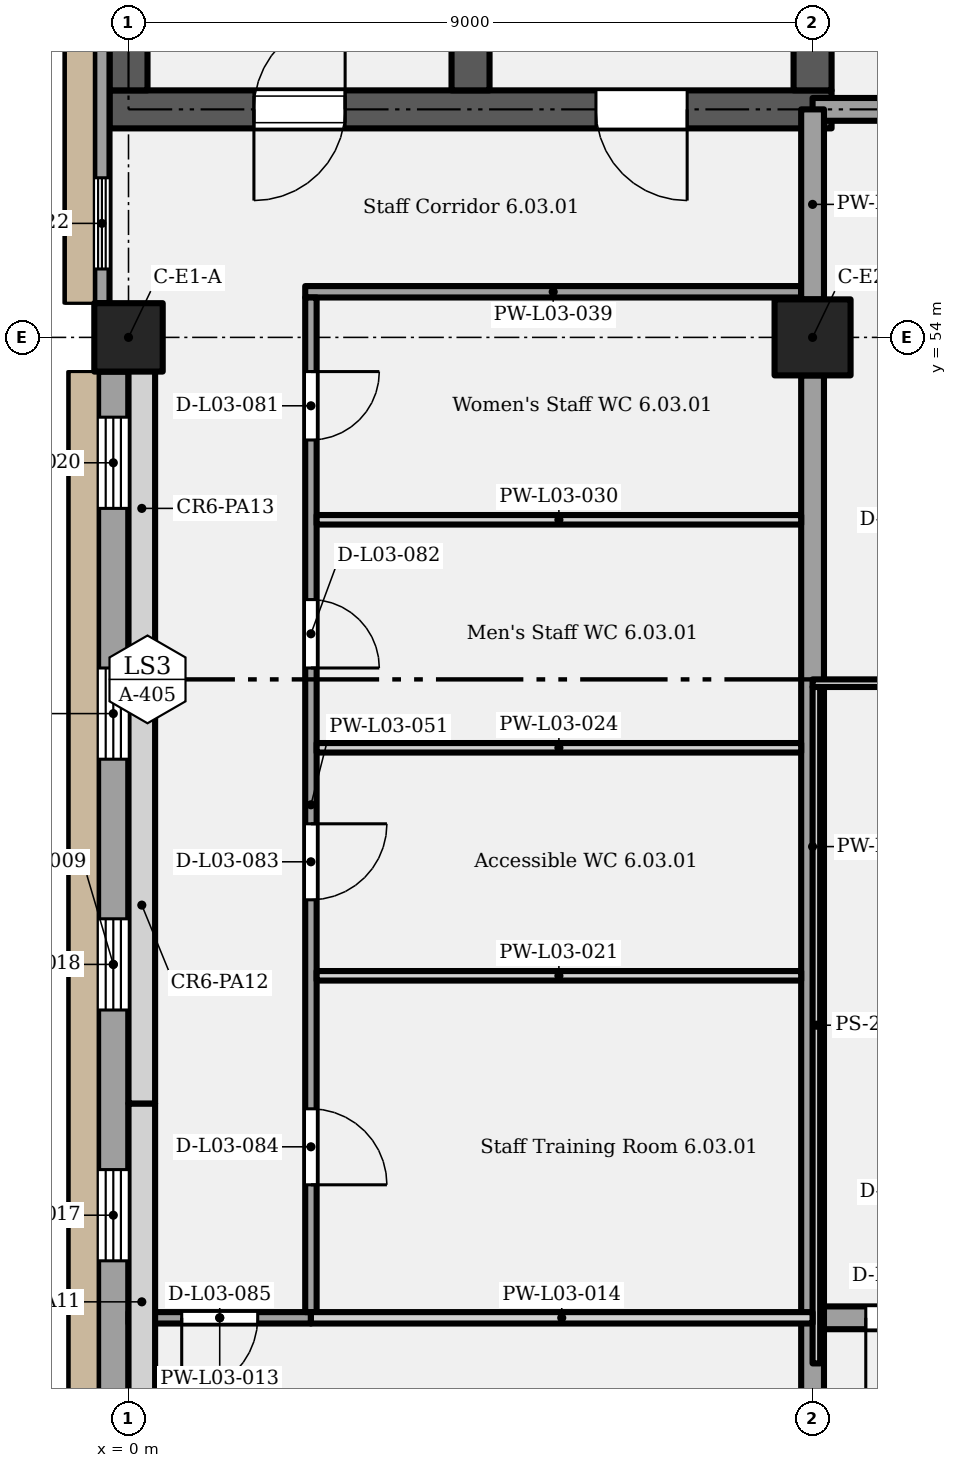
"""IFC4 building model, lengths in metres.
Left out: names, types, materials, properties, quantities, classifications, styles, units other than length and angle.
Written with IfcOpenShell. Run it as: python <this file> out.ifc"""

import sys

from ifc_helpers import new_model, si_unit, direction, frame, frame_2d, origin, origin_2d, place, context, subcontext, project, spatial, rectangle, extrude, element, fill, save


model = new_model("IFC4")
c1 = context("Model", 3, precision=1e-05, world=origin(), true_north=direction((0.0, 1.0)))
c2 = subcontext(c1, "Body", "Model", "MODEL_VIEW")
j1 = project(units=[si_unit("LENGTHUNIT", "METRE"), si_unit("PLANEANGLEUNIT", "RADIAN")], contexts=[c1])
p1 = place(None, origin())
s1 = spatial("IfcSite", under=j1, at=p1, CompositionType="ELEMENT")
p2 = place(p1, origin())
s2 = spatial("IfcBuilding", under=s1, at=p2, CompositionType="ELEMENT")
p3 = place(p2, frame((0.0, 0.0, 17.4)))
s3 = spatial("IfcBuildingStorey", under=s2, at=p3, CompositionType="ELEMENT", Elevation=17.4)
p4 = place(p3, frame((0.0, 54.0, 0.0), z_axis=(0.0, 0.0, 1.0), x_axis=(1.0, 0.0, 0.0)))
e1 = element("IfcColumn", 1, at=p4, inside=s3, PredefinedType="COLUMN", context=c2, shape_type="SweptSolid", body=[
    extrude(rectangle(XDim=0.9, YDim=0.9, at=origin_2d()), origin(), (0.0, 0.0, 1.0), 5.4),
])
p5 = place(p3, frame((9.0, 54.0, 0.0), z_axis=(0.0, 0.0, 1.0), x_axis=(1.0, 0.0, 0.0)))
e2 = element("IfcColumn", 2, at=p5, inside=s3, PredefinedType="COLUMN", context=c2, shape_type="SweptSolid", body=[
    extrude(rectangle(XDim=1.0, YDim=1.0, at=origin_2d()), origin(), (0.0, 0.0, 1.0), 5.4),
])
p6 = place(p3, frame((-0.25, 57.0, 0.0), z_axis=(0.0, 0.0, 1.0), x_axis=(1.0, 0.0, 0.0)))
e3 = element("IfcWall", 3, at=p6, inside=s3, PredefinedType="SHEAR", context=c2, shape_type="SweptSolid", body=[
    extrude(rectangle(XDim=9.5, YDim=0.5, at=frame_2d((4.75, 0.0))), origin(), (0.0, 0.0, 1.0), 5.15),
])
p7 = place(p6, frame((1.9, 0.0, 0.0)))
e4 = element("IfcOpeningElement", 4, at=p7, cuts=e3, PredefinedType="OPENING", context=c2, shape_type="SweptSolid", body=[
    extrude(rectangle(XDim=1.2, YDim=2.1, at=frame_2d((0.6, 1.05))), frame((0.0, 0.26, 0.0), z_axis=(0.0, -1.0, 0.0), x_axis=(1.0, 0.0, 0.0)), (0.0, 0.0, 1.0), 0.52),
])
p8 = place(p6, frame((7.6, 0.0, 0.0), z_axis=(0.0, 0.0, 1.0), x_axis=(-1.0, 0.0, 0.0)))
e5 = element("IfcOpeningElement", 5, at=p8, cuts=e3, PredefinedType="OPENING", context=c2, shape_type="SweptSolid", body=[
    extrude(rectangle(XDim=1.2, YDim=2.1, at=frame_2d((0.6, 1.05))), frame((0.0, 0.26, 0.0), z_axis=(0.0, -1.0, 0.0), x_axis=(1.0, 0.0, 0.0)), (0.0, 0.0, 1.0), 0.52),
])
p9 = place(p3, frame((0.0, 57.25, 0.0), z_axis=(0.0, 0.0, 1.0), x_axis=(0.0, 1.0, 0.0)))
e6 = element("IfcWall", 6, at=p9, inside=s3, PredefinedType="SHEAR", context=c2, shape_type="SweptSolid", body=[
    extrude(rectangle(XDim=8.3, YDim=0.5, at=frame_2d((4.15, 0.0))), origin(), (0.0, 0.0, 1.0), 5.15),
])
p10 = place(p3, frame((4.5, 57.25, 0.0), z_axis=(0.0, 0.0, 1.0), x_axis=(0.0, 1.0, 0.0)))
e7 = element("IfcWall", 7, at=p10, inside=s3, PredefinedType="SHEAR", context=c2, shape_type="SweptSolid", body=[
    extrude(rectangle(XDim=8.5, YDim=0.5, at=frame_2d((4.25, 0.0))), origin(), (0.0, 0.0, 1.0), 5.15),
])
p11 = place(p3, frame((9.0, 57.25, 0.0), z_axis=(0.0, 0.0, 1.0), x_axis=(0.0, 1.0, 0.0)))
e8 = element("IfcWall", 8, at=p11, inside=s3, PredefinedType="SHEAR", context=c2, shape_type="SweptSolid", body=[
    extrude(rectangle(XDim=8.3, YDim=0.5, at=frame_2d((4.15, 0.0))), origin(), (0.0, 0.0, 1.0), 5.15),
])
p12 = place(p3, frame((-0.2, 37.95, 0.0), z_axis=(0.0, 0.0, 1.0), x_axis=(0.0, 1.0, 0.0)))
e9 = element("IfcWall", 9, at=p12, inside=s3, PredefinedType="SOLIDWALL", context=c2, shape_type="SweptSolid", body=[
    extrude(rectangle(XDim=15.6, YDim=0.4, at=frame_2d((7.8, 0.0))), origin(), (0.0, 0.0, 1.0), 5.15),
])
p13 = place(p12, frame((3.9, 0.0, 0.9)))
e10 = element("IfcOpeningElement", 10, at=p13, cuts=e9, PredefinedType="OPENING", context=c2, shape_type="SweptSolid", body=[
    extrude(rectangle(XDim=1.2, YDim=2.4, at=frame_2d((0.6, 1.2))), frame((0.0, 0.21, 0.0), z_axis=(0.0, -1.0, 0.0), x_axis=(1.0, 0.0, 0.0)), (0.0, 0.0, 1.0), 0.42),
])
p14 = place(p12, frame((7.2, 0.0, 0.9)))
e11 = element("IfcOpeningElement", 11, at=p14, cuts=e9, PredefinedType="OPENING", context=c2, shape_type="SweptSolid", body=[
    extrude(rectangle(XDim=1.2, YDim=2.4, at=frame_2d((0.6, 1.2))), frame((0.0, 0.21, 0.0), z_axis=(0.0, -1.0, 0.0), x_axis=(1.0, 0.0, 0.0)), (0.0, 0.0, 1.0), 0.42),
])
p15 = place(p12, frame((10.5, 0.0, 0.9)))
e12 = element("IfcOpeningElement", 12, at=p15, cuts=e9, PredefinedType="OPENING", context=c2, shape_type="SweptSolid", body=[
    extrude(rectangle(XDim=1.2, YDim=2.4, at=frame_2d((0.6, 1.2))), frame((0.0, 0.21, 0.0), z_axis=(0.0, -1.0, 0.0), x_axis=(1.0, 0.0, 0.0)), (0.0, 0.0, 1.0), 0.42),
])
p16 = place(p12, frame((13.8, 0.0, 0.9)))
e13 = element("IfcOpeningElement", 13, at=p16, cuts=e9, PredefinedType="OPENING", context=c2, shape_type="SweptSolid", body=[
    extrude(rectangle(XDim=1.2, YDim=2.4, at=frame_2d((0.6, 1.2))), frame((0.0, 0.21, 0.0), z_axis=(0.0, -1.0, 0.0), x_axis=(1.0, 0.0, 0.0)), (0.0, 0.0, 1.0), 0.42),
])
p17 = place(p12, frame((0.475, 0.0, 1.5)))
e14 = element("IfcOpeningElement", 14, at=p17, cuts=e9, PredefinedType="OPENING", context=c2, shape_type="SweptSolid", body=[
    extrude(rectangle(XDim=0.9, YDim=1.8, at=frame_2d((0.45, 0.9))), frame((0.0, 0.21, 0.0), z_axis=(0.0, -1.0, 0.0), x_axis=(1.0, 0.0, 0.0)), (0.0, 0.0, 1.0), 0.42),
])
p18 = place(p3, frame((-0.35, 54.45, 0.0), z_axis=(0.0, 0.0, 1.0), x_axis=(0.0, 1.0, 0.0)))
e15 = element("IfcWall", 15, at=p18, inside=s3, PredefinedType="SOLIDWALL", context=c2, shape_type="SweptSolid", body=[
    extrude(rectangle(XDim=11.1, YDim=0.2, at=frame_2d((5.55, 0.0))), origin(), (0.0, 0.0, 1.0), 5.15),
])
p19 = place(p18, frame((0.45, 0.0, 0.9)))
e16 = element("IfcOpeningElement", 16, at=p19, cuts=e15, PredefinedType="OPENING", context=c2, shape_type="SweptSolid", body=[
    extrude(rectangle(XDim=1.2, YDim=2.4, at=frame_2d((0.6, 1.2))), frame((0.0, 0.11, 0.0), z_axis=(0.0, -1.0, 0.0), x_axis=(1.0, 0.0, 0.0)), (0.0, 0.0, 1.0), 0.22),
])
p20 = place(p3, frame((0.175, 38.7, 5.4), z_axis=(0.0, 0.0, 1.0), x_axis=(0.0, 1.0, 0.0)))
e17 = element("IfcWall", 17, at=p20, inside=s3, PredefinedType="PARAPET", context=c2, shape_type="SweptSolid", body=[
    extrude(rectangle(XDim=5.22, YDim=0.35, at=frame_2d((2.61, 0.0))), origin(), (0.0, 0.0, 1.0), 1.2),
])
p21 = place(p3, frame((0.175, 43.92, 5.4), z_axis=(0.0, 0.0, 1.0), x_axis=(0.0, 1.0, 0.0)))
e18 = element("IfcWall", 18, at=p21, inside=s3, PredefinedType="PARAPET", context=c2, shape_type="SweptSolid", body=[
    extrude(rectangle(XDim=5.22, YDim=0.35, at=frame_2d((2.61, 0.0))), origin(), (0.0, 0.0, 1.0), 1.5),
])
p22 = place(p3, frame((0.175, 49.14, 5.4), z_axis=(0.0, 0.0, 1.0), x_axis=(0.0, 1.0, 0.0)))
e19 = element("IfcWall", 19, at=p22, inside=s3, PredefinedType="PARAPET", context=c2, shape_type="SweptSolid", body=[
    extrude(rectangle(XDim=5.22, YDim=0.35, at=frame_2d((2.61, 0.0))), origin(), (0.0, 0.0, 1.0), 1.8),
])
p23 = place(p3, frame((9.0, 49.45, 5.4), z_axis=(0.0, 0.0, 1.0), x_axis=(1.0, 0.0, 0.0)))
e20 = element("IfcWall", 20, at=p23, inside=s3, PredefinedType="SOLIDWALL", context=c2, shape_type="SweptSolid", body=[
    extrude(rectangle(XDim=9.0, YDim=0.1, at=frame_2d((4.5, 0.0))), origin(), (0.0, 0.0, 1.0), 2.4),
])
p24 = place(p3, frame((9.05, 40.5, 5.4), z_axis=(0.0, 0.0, 1.0), x_axis=(0.0, 1.0, 0.0)))
e21 = element("IfcWall", 21, at=p24, inside=s3, PredefinedType="SOLIDWALL", context=c2, shape_type="SweptSolid", body=[
    extrude(rectangle(XDim=8.9, YDim=0.1, at=frame_2d((4.45, 0.0))), origin(), (0.0, 0.0, 1.0), 2.4),
])
p25 = place(p3, frame((-0.175, 57.0, 5.4), z_axis=(0.0, 0.0, 1.0), x_axis=(1.0, 0.0, 0.0)))
e22 = element("IfcWall", 22, at=p25, inside=s3, PredefinedType="SOLIDWALL", context=c2, shape_type="SweptSolid", body=[
    extrude(rectangle(XDim=4.85, YDim=0.35, at=frame_2d((2.425, 0.0))), origin(), (0.0, 0.0, 1.0), 3.1),
])
p26 = place(p25, frame((3.025, 0.0, 0.0), z_axis=(0.0, 0.0, 1.0), x_axis=(-1.0, 0.0, 0.0)))
e23 = element("IfcOpeningElement", 23, at=p26, cuts=e22, PredefinedType="OPENING", context=c2, shape_type="SweptSolid", body=[
    extrude(rectangle(XDim=1.2, YDim=2.1, at=frame_2d((0.6, 1.05))), frame((0.0, 0.185, 0.0), z_axis=(0.0, -1.0, 0.0), x_axis=(1.0, 0.0, 0.0)), (0.0, 0.0, 1.0), 0.37),
])
for number, where, z_axis, x_axis in (
    (24, (0.0, 57.175, 5.4), (0.0, 0.0, 1.0), (0.0, 1.0, 0.0)),
    (25, (4.5, 57.175, 5.4), (0.0, 0.0, 1.0), (0.0, 1.0, 0.0)),
):
    element("IfcWall", number, at=place(p3, frame(where, z_axis=z_axis, x_axis=x_axis)), inside=s3, PredefinedType="SOLIDWALL", context=c2, shape_type="SweptSolid", body=[
        extrude(rectangle(XDim=8.65, YDim=0.35, at=frame_2d((4.325, 0.0))), origin(), (0.0, 0.0, 1.0), 3.1),
    ])
p27 = place(p3, frame((0.0, 41.1, 0.0), z_axis=(0.0, 0.0, 1.0), x_axis=(1.0, 0.0, 0.0)))
e26 = element("IfcWall", 26, at=p27, inside=s3, PredefinedType="PARTITIONING", context=c2, shape_type="SweptSolid", body=[
    extrude(rectangle(XDim=2.4, YDim=0.15, at=frame_2d((1.2, 0.0))), origin(), (0.0, 0.0, 1.0), 5.15),
])
p28 = place(p27, frame((1.7, 0.0, 0.0), z_axis=(0.0, 0.0, 1.0), x_axis=(-1.0, 0.0, 0.0)))
e27 = element("IfcOpeningElement", 27, at=p28, cuts=e26, PredefinedType="OPENING", context=c2, shape_type="SweptSolid", body=[
    extrude(rectangle(XDim=1.0, YDim=2.1, at=frame_2d((0.5, 1.05))), frame((0.0, 0.085, 0.0), z_axis=(0.0, -1.0, 0.0), x_axis=(1.0, 0.0, 0.0)), (0.0, 0.0, 1.0), 0.17),
])
p29 = place(p3, frame((2.4, 41.1, 0.0), z_axis=(0.0, 0.0, 1.0), x_axis=(1.0, 0.0, 0.0)))
e28 = element("IfcWall", 28, at=p29, inside=s3, PredefinedType="PARTITIONING", context=c2, shape_type="SweptSolid", body=[
    extrude(rectangle(XDim=6.6, YDim=0.15, at=frame_2d((3.3, 0.0))), origin(), (0.0, 0.0, 1.0), 5.15),
])
p30 = place(p3, frame((9.0, 41.1, 0.0), z_axis=(0.0, 0.0, 1.0), x_axis=(1.0, 0.0, 0.0)))
e29 = element("IfcWall", 29, at=p30, inside=s3, PredefinedType="PARTITIONING", context=c2, shape_type="SweptSolid", body=[
    extrude(rectangle(XDim=8.85, YDim=0.3, at=frame_2d((4.425, 0.0))), origin(), (0.0, 0.0, 1.0), 5.15),
])
p31 = place(p30, frame((1.7, 0.0, 0.0), z_axis=(0.0, 0.0, 1.0), x_axis=(-1.0, 0.0, 0.0)))
e30 = element("IfcOpeningElement", 30, at=p31, cuts=e29, PredefinedType="OPENING", context=c2, shape_type="SweptSolid", body=[
    extrude(rectangle(XDim=1.0, YDim=2.1, at=frame_2d((0.5, 1.05))), frame((0.0, 0.16, 0.0), z_axis=(0.0, -1.0, 0.0), x_axis=(1.0, 0.0, 0.0)), (0.0, 0.0, 1.0), 0.32),
])
for number, where, z_axis, x_axis in (
    (31, (2.475, 45.6, 0.0), (0.0, 0.0, 1.0), (1.0, 0.0, 0.0)),
    (32, (2.475, 48.6, 0.0), (0.0, 0.0, 1.0), (1.0, 0.0, 0.0)),
    (33, (2.475, 51.6, 0.0), (0.0, 0.0, 1.0), (1.0, 0.0, 0.0)),
):
    element("IfcWall", number, at=place(p3, frame(where, z_axis=z_axis, x_axis=x_axis)), inside=s3, PredefinedType="PARTITIONING", context=c2, shape_type="SweptSolid", body=[
        extrude(rectangle(XDim=6.375, YDim=0.125, at=frame_2d((3.188, 0.0))), origin(), (0.0, 0.0, 1.0), 5.15),
    ])
p32 = place(p3, frame((2.325, 54.6, 0.0), z_axis=(0.0, 0.0, 1.0), x_axis=(1.0, 0.0, 0.0)))
e34 = element("IfcWall", 34, at=p32, inside=s3, PredefinedType="PARTITIONING", context=c2, shape_type="SweptSolid", body=[
    extrude(rectangle(XDim=6.525, YDim=0.15, at=frame_2d((3.263, 0.0))), origin(), (0.0, 0.0, 1.0), 5.15),
])
p33 = place(p3, frame((9.0, 57.0, 0.0), z_axis=(0.0, 0.0, 1.0), x_axis=(1.0, 0.0, 0.0)))
e35 = element("IfcWall", 35, at=p33, inside=s3, PredefinedType="PARTITIONING", context=c2, shape_type="SweptSolid", body=[
    extrude(rectangle(XDim=9.0, YDim=0.3, at=frame_2d((4.5, 0.0))), origin(), (0.0, 0.0, 1.0), 5.15),
])
p34 = place(p33, frame((3.9, 0.0, 0.0)))
e36 = element("IfcOpeningElement", 36, at=p34, cuts=e35, PredefinedType="OPENING", context=c2, shape_type="SweptSolid", body=[
    extrude(rectangle(XDim=1.2, YDim=2.1, at=frame_2d((0.6, 1.05))), frame((0.0, 0.16, 0.0), z_axis=(0.0, -1.0, 0.0), x_axis=(1.0, 0.0, 0.0)), (0.0, 0.0, 1.0), 0.32),
])
p35 = place(p3, frame((2.4, 41.175, 0.0), z_axis=(0.0, 0.0, 1.0), x_axis=(0.0, 1.0, 0.0)))
e37 = element("IfcWall", 37, at=p35, inside=s3, PredefinedType="PARTITIONING", context=c2, shape_type="SweptSolid", body=[
    extrude(rectangle(XDim=13.35, YDim=0.15, at=frame_2d((6.675, 0.0))), origin(), (0.0, 0.0, 1.0), 5.15),
])
p36 = place(p35, frame((12.375, 0.0, 0.0), z_axis=(0.0, 0.0, 1.0), x_axis=(-1.0, 0.0, 0.0)))
e38 = element("IfcOpeningElement", 38, at=p36, cuts=e37, PredefinedType="OPENING", context=c2, shape_type="SweptSolid", body=[
    extrude(rectangle(XDim=0.9, YDim=2.1, at=frame_2d((0.45, 1.05))), frame((0.0, 0.085, 0.0), z_axis=(0.0, -1.0, 0.0), x_axis=(1.0, 0.0, 0.0)), (0.0, 0.0, 1.0), 0.17),
])
p37 = place(p35, frame((9.375, 0.0, 0.0), z_axis=(0.0, 0.0, 1.0), x_axis=(-1.0, 0.0, 0.0)))
e39 = element("IfcOpeningElement", 39, at=p37, cuts=e37, PredefinedType="OPENING", context=c2, shape_type="SweptSolid", body=[
    extrude(rectangle(XDim=0.9, YDim=2.1, at=frame_2d((0.45, 1.05))), frame((0.0, 0.085, 0.0), z_axis=(0.0, -1.0, 0.0), x_axis=(1.0, 0.0, 0.0)), (0.0, 0.0, 1.0), 0.17),
])
p38 = place(p35, frame((6.425, 0.0, 0.0), z_axis=(0.0, 0.0, 1.0), x_axis=(-1.0, 0.0, 0.0)))
e40 = element("IfcOpeningElement", 40, at=p38, cuts=e37, PredefinedType="OPENING", context=c2, shape_type="SweptSolid", body=[
    extrude(rectangle(XDim=1.0, YDim=2.1, at=frame_2d((0.5, 1.05))), frame((0.0, 0.085, 0.0), z_axis=(0.0, -1.0, 0.0), x_axis=(1.0, 0.0, 0.0)), (0.0, 0.0, 1.0), 0.17),
])
p39 = place(p35, frame((2.675, 0.0, 0.0), z_axis=(0.0, 0.0, 1.0), x_axis=(-1.0, 0.0, 0.0)))
e41 = element("IfcOpeningElement", 41, at=p39, cuts=e37, PredefinedType="OPENING", context=c2, shape_type="SweptSolid", body=[
    extrude(rectangle(XDim=1.0, YDim=2.1, at=frame_2d((0.5, 1.05))), frame((0.0, 0.085, 0.0), z_axis=(0.0, -1.0, 0.0), x_axis=(1.0, 0.0, 0.0)), (0.0, 0.0, 1.0), 0.17),
])
p40 = place(p3, frame((9.0, 38.0, 0.0), z_axis=(0.0, 0.0, 1.0), x_axis=(0.0, 1.0, 0.0)))
e42 = element("IfcWall", 42, at=p40, inside=s3, PredefinedType="PARTITIONING", context=c2, shape_type="SweptSolid", body=[
    extrude(rectangle(XDim=3.1, YDim=0.3, at=frame_2d((1.55, 0.0))), origin(), (0.0, 0.0, 1.0), 4.2),
])
p41 = place(p3, frame((9.0, 41.1, 0.0), z_axis=(0.0, 0.0, 1.0), x_axis=(0.0, 1.0, 0.0)))
e43 = element("IfcWall", 43, at=p41, inside=s3, PredefinedType="PARTITIONING", context=c2, shape_type="SweptSolid", body=[
    extrude(rectangle(XDim=12.4, YDim=0.3, at=frame_2d((6.2, 0.0))), origin(), (0.0, 0.0, 1.0), 4.2),
])
p42 = place(p3, frame((9.0, 54.5, 0.0), z_axis=(0.0, 0.0, 1.0), x_axis=(0.0, 1.0, 0.0)))
e44 = element("IfcWall", 44, at=p42, inside=s3, PredefinedType="PARTITIONING", context=c2, shape_type="SweptSolid", body=[
    extrude(rectangle(XDim=2.5, YDim=0.3, at=frame_2d((1.25, 0.0))), origin(), (0.0, 0.0, 1.0), 4.4),
])
p43 = place(p13, origin())
e45 = element("IfcWindow", 45, at=p43, inside=s3, PartitioningType="SINGLE_PANEL", PredefinedType="WINDOW", context=c2, shape_type="SweptSolid", body=[
    extrude(rectangle(XDim=1.2, YDim=2.4, at=frame_2d((0.6, 1.2))), frame((0.0, 0.03, 0.0), z_axis=(0.0, -1.0, 0.0), x_axis=(1.0, 0.0, 0.0)), (0.0, 0.0, 1.0), 0.06),
])
fill(e10, e45)
p44 = place(p14, origin())
e46 = element("IfcWindow", 46, at=p44, inside=s3, PartitioningType="SINGLE_PANEL", PredefinedType="WINDOW", context=c2, shape_type="SweptSolid", body=[
    extrude(rectangle(XDim=1.2, YDim=2.4, at=frame_2d((0.6, 1.2))), frame((0.0, 0.03, 0.0), z_axis=(0.0, -1.0, 0.0), x_axis=(1.0, 0.0, 0.0)), (0.0, 0.0, 1.0), 0.06),
])
fill(e11, e46)
p45 = place(p15, origin())
e47 = element("IfcWindow", 47, at=p45, inside=s3, PartitioningType="SINGLE_PANEL", PredefinedType="WINDOW", context=c2, shape_type="SweptSolid", body=[
    extrude(rectangle(XDim=1.2, YDim=2.4, at=frame_2d((0.6, 1.2))), frame((0.0, 0.03, 0.0), z_axis=(0.0, -1.0, 0.0), x_axis=(1.0, 0.0, 0.0)), (0.0, 0.0, 1.0), 0.06),
])
fill(e12, e47)
p46 = place(p16, origin())
e48 = element("IfcWindow", 48, at=p46, inside=s3, PartitioningType="SINGLE_PANEL", PredefinedType="WINDOW", context=c2, shape_type="SweptSolid", body=[
    extrude(rectangle(XDim=1.2, YDim=2.4, at=frame_2d((0.6, 1.2))), frame((0.0, 0.03, 0.0), z_axis=(0.0, -1.0, 0.0), x_axis=(1.0, 0.0, 0.0)), (0.0, 0.0, 1.0), 0.06),
])
fill(e13, e48)
p47 = place(p19, origin())
e49 = element("IfcWindow", 49, at=p47, inside=s3, PartitioningType="SINGLE_PANEL", PredefinedType="WINDOW", context=c2, shape_type="SweptSolid", body=[
    extrude(rectangle(XDim=1.2, YDim=2.4, at=frame_2d((0.6, 1.2))), frame((0.0, 0.03, 0.0), z_axis=(0.0, -1.0, 0.0), x_axis=(1.0, 0.0, 0.0)), (0.0, 0.0, 1.0), 0.06),
])
fill(e16, e49)
p48 = place(p26, origin())
e50 = element("IfcDoor", 50, at=p48, inside=s3, OperationType="SINGLE_SWING_LEFT", PredefinedType="DOOR", context=c2, shape_type="SweptSolid", body=[
    extrude(rectangle(XDim=1.2, YDim=2.1, at=frame_2d((0.6, 1.05))), frame((0.0, 0.025, 0.0), z_axis=(0.0, -1.0, 0.0), x_axis=(1.0, 0.0, 0.0)), (0.0, 0.0, 1.0), 0.05),
])
fill(e23, e50)
p49 = place(p7, origin())
e51 = element("IfcDoor", 51, at=p49, inside=s3, OperationType="SINGLE_SWING_RIGHT", PredefinedType="DOOR", context=c2, shape_type="SweptSolid", body=[
    extrude(rectangle(XDim=1.2, YDim=2.1, at=frame_2d((0.6, 1.05))), frame((0.0, 0.025, 0.0), z_axis=(0.0, -1.0, 0.0), x_axis=(1.0, 0.0, 0.0)), (0.0, 0.0, 1.0), 0.05),
])
fill(e4, e51)
p50 = place(p8, origin())
e52 = element("IfcDoor", 52, at=p50, inside=s3, OperationType="SINGLE_SWING_LEFT", PredefinedType="DOOR", context=c2, shape_type="SweptSolid", body=[
    extrude(rectangle(XDim=1.2, YDim=2.1, at=frame_2d((0.6, 1.05))), frame((0.0, 0.025, 0.0), z_axis=(0.0, -1.0, 0.0), x_axis=(1.0, 0.0, 0.0)), (0.0, 0.0, 1.0), 0.05),
])
fill(e5, e52)
p51 = place(p36, origin())
e53 = element("IfcDoor", 53, at=p51, inside=s3, OperationType="SINGLE_SWING_LEFT", PredefinedType="DOOR", context=c2, shape_type="SweptSolid", body=[
    extrude(rectangle(XDim=0.9, YDim=2.1, at=frame_2d((0.45, 1.05))), frame((0.0, 0.025, 0.0), z_axis=(0.0, -1.0, 0.0), x_axis=(1.0, 0.0, 0.0)), (0.0, 0.0, 1.0), 0.05),
])
fill(e38, e53)
p52 = place(p37, origin())
e54 = element("IfcDoor", 54, at=p52, inside=s3, OperationType="SINGLE_SWING_RIGHT", PredefinedType="DOOR", context=c2, shape_type="SweptSolid", body=[
    extrude(rectangle(XDim=0.9, YDim=2.1, at=frame_2d((0.45, 1.05))), frame((0.0, 0.025, 0.0), z_axis=(0.0, -1.0, 0.0), x_axis=(1.0, 0.0, 0.0)), (0.0, 0.0, 1.0), 0.05),
])
fill(e39, e54)
p53 = place(p38, origin())
e55 = element("IfcDoor", 55, at=p53, inside=s3, OperationType="SINGLE_SWING_LEFT", PredefinedType="DOOR", context=c2, shape_type="SweptSolid", body=[
    extrude(rectangle(XDim=1.0, YDim=2.1, at=frame_2d((0.5, 1.05))), frame((0.0, 0.025, 0.0), z_axis=(0.0, -1.0, 0.0), x_axis=(1.0, 0.0, 0.0)), (0.0, 0.0, 1.0), 0.05),
])
fill(e40, e55)
p54 = place(p39, origin())
e56 = element("IfcDoor", 56, at=p54, inside=s3, OperationType="SINGLE_SWING_RIGHT", PredefinedType="DOOR", context=c2, shape_type="SweptSolid", body=[
    extrude(rectangle(XDim=1.0, YDim=2.1, at=frame_2d((0.5, 1.05))), frame((0.0, 0.025, 0.0), z_axis=(0.0, -1.0, 0.0), x_axis=(1.0, 0.0, 0.0)), (0.0, 0.0, 1.0), 0.05),
])
fill(e41, e56)
p55 = place(p28, origin())
e57 = element("IfcDoor", 57, at=p55, inside=s3, OperationType="SINGLE_SWING_RIGHT", PredefinedType="DOOR", context=c2, shape_type="SweptSolid", body=[
    extrude(rectangle(XDim=1.0, YDim=2.1, at=frame_2d((0.5, 1.05))), frame((0.0, 0.025, 0.0), z_axis=(0.0, -1.0, 0.0), x_axis=(1.0, 0.0, 0.0)), (0.0, 0.0, 1.0), 0.05),
])
fill(e27, e57)
p56 = place(p31, origin())
e58 = element("IfcDoor", 58, at=p56, inside=s3, OperationType="SINGLE_SWING_RIGHT", PredefinedType="DOOR", context=c2, shape_type="SweptSolid", body=[
    extrude(rectangle(XDim=1.0, YDim=2.1, at=frame_2d((0.5, 1.05))), frame((0.0, 0.025, 0.0), z_axis=(0.0, -1.0, 0.0), x_axis=(1.0, 0.0, 0.0)), (0.0, 0.0, 1.0), 0.05),
])
fill(e30, e58)
save(model, sys.argv[1])
